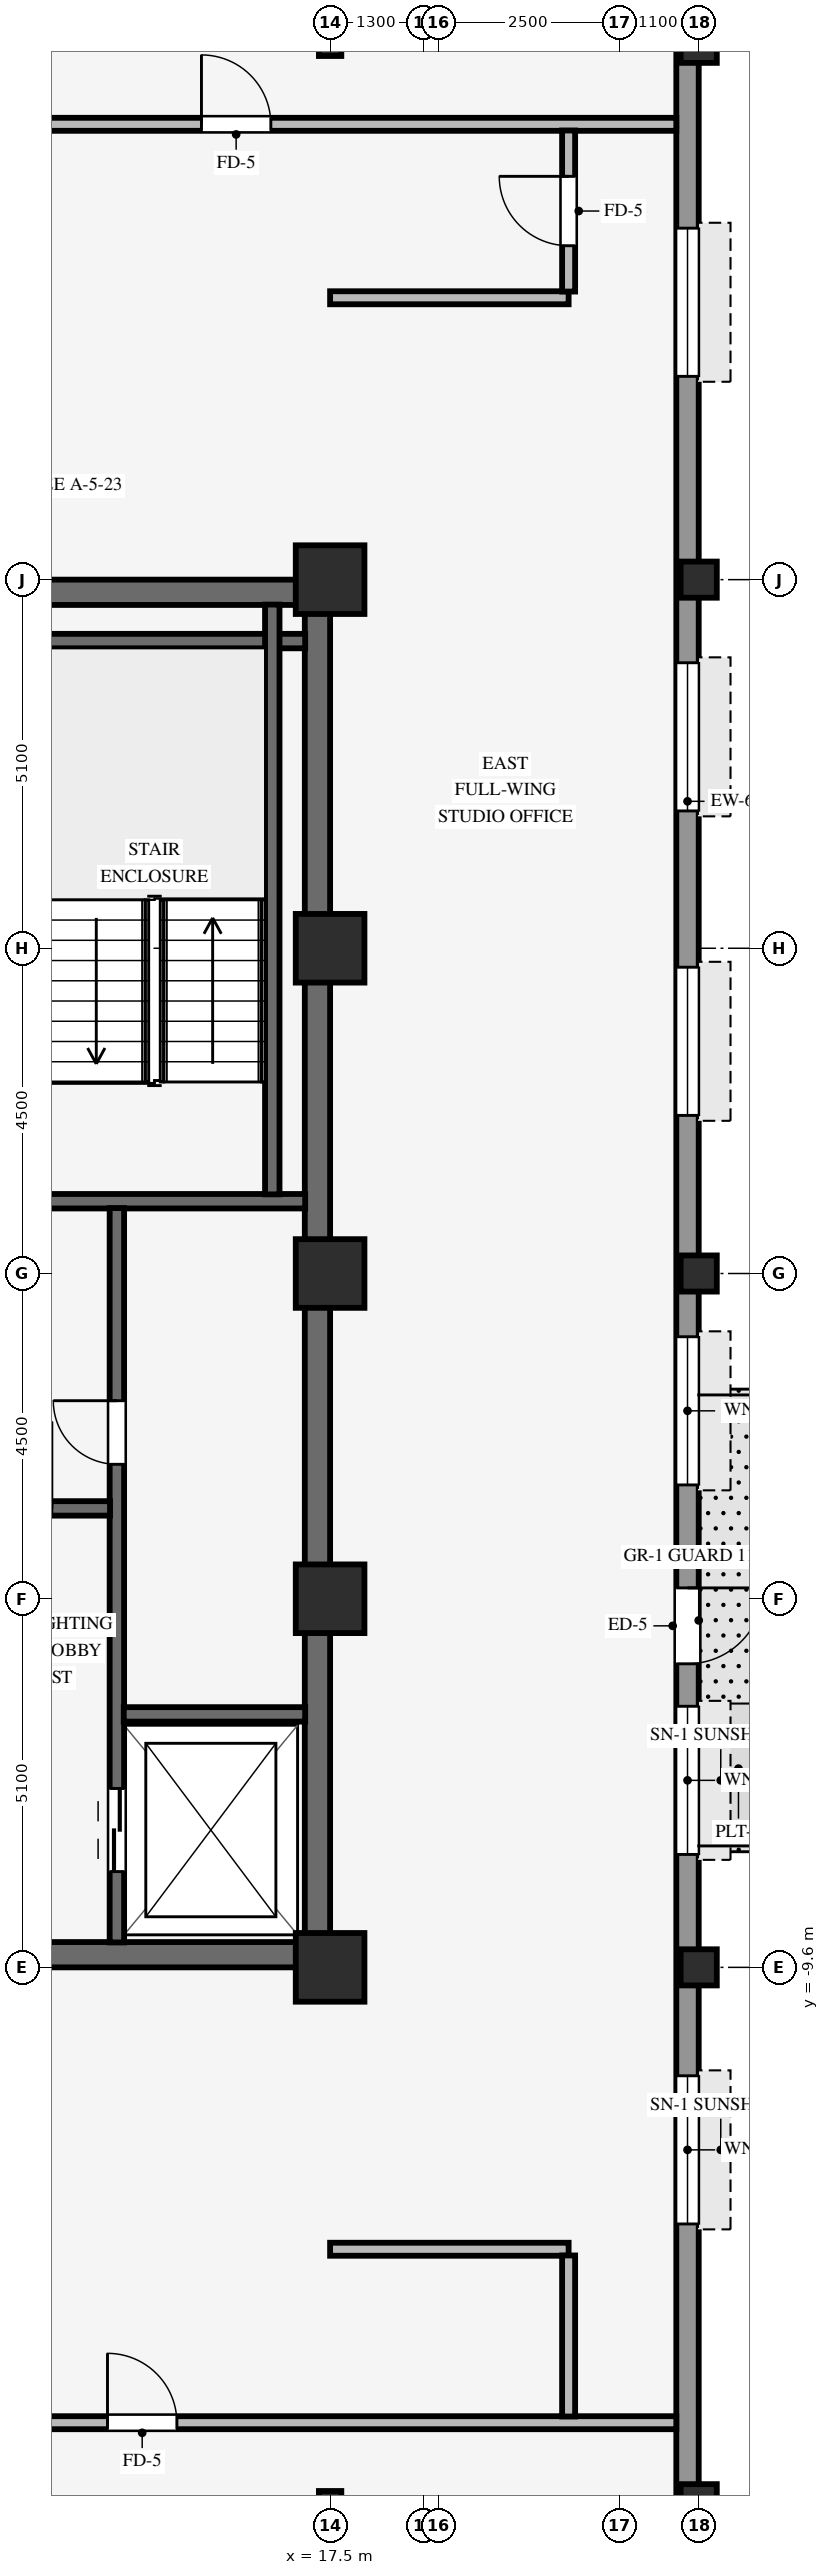
"""IFC4 building model, lengths in metres.
Left out: names, types, materials, properties, quantities, classifications, styles, units other than length and angle.
Written with IfcOpenShell. Run it as: python <this file> out.ifc"""

import sys

from ifc_helpers import new_model, si_unit, direction, frame, frame_2d, origin, origin_2d, place, context, subcontext, project, spatial, rectangle, hollow_rectangle, i_section, extrude, source, transform, mapped, element, fill, save


model = new_model("IFC4")
c1 = context("Model", 3, precision=1e-05, world=origin(), true_north=direction((0.0, 1.0)))
c2 = subcontext(c1, "Body", "Model", "MODEL_VIEW")
j1 = project(units=[si_unit("LENGTHUNIT", "METRE"), si_unit("PLANEANGLEUNIT", "RADIAN")], contexts=[c1])
p1 = place(None, origin())
s1 = spatial("IfcSite", under=j1, at=p1, CompositionType="ELEMENT")
p2 = place(p1, origin())
s2 = spatial("IfcBuilding", under=s1, at=p2, CompositionType="ELEMENT")
p3 = place(p2, frame((0.0, 0.0, 201.85)))
s3 = spatial("IfcBuildingStorey", under=s2, at=p3, CompositionType="ELEMENT", Elevation=201.85)
for number, where, z_axis, x_axis in (
    (1, (9.0, -9.425, 0.0), (0.0, 0.0, 1.0), (1.0, 0.0, 0.0)),
    (2, (9.0, 9.425, 0.0), (0.0, 0.0, 1.0), (1.0, 0.0, 0.0)),
):
    element("IfcWall", number, at=place(p3, frame(where, z_axis=z_axis, x_axis=x_axis)), inside=s3, PredefinedType="SHEAR", context=c2, shape_type="SweptSolid", body=[
        extrude(rectangle(XDim=8.5, YDim=0.35, at=frame_2d((4.25, 0.0))), origin(), (0.0, 0.0, 1.0), 3.37),
    ])
p4 = place(p3, frame((17.325, -9.255, 0.0), z_axis=(0.0, 0.0, 1.0), x_axis=(0.0, 1.0, 0.0)))
e3 = element("IfcWall", 3, at=p4, inside=s3, PredefinedType="SHEAR", context=c2, shape_type="SweptSolid", body=[
    extrude(rectangle(XDim=18.51, YDim=0.35, at=frame_2d((9.255, 0.0))), origin(), (0.0, 0.0, 1.0), 3.37),
])
for number, where, z_axis, x_axis in (
    (4, (17.5, -9.6, 0.0), (0.0, 0.0, 1.0), (1.0, 0.0, 0.0)),
    (5, (17.5, -4.5, 0.0), (0.0, 0.0, 1.0), (1.0, 0.0, 0.0)),
    (6, (17.5, 4.5, 0.0), (0.0, 0.0, 1.0), (1.0, 0.0, 0.0)),
    (7, (17.5, 9.6, 0.0), (0.0, 0.0, 1.0), (1.0, 0.0, 0.0)),
    (8, (17.5, 0.0, 0.0), (0.0, 0.0, 1.0), (1.0, 0.0, 0.0)),
):
    element("IfcColumn", number, at=place(p3, frame(where, z_axis=z_axis, x_axis=x_axis)), inside=s3, PredefinedType="COLUMN", context=c2, shape_type="SweptSolid", body=[
        extrude(rectangle(XDim=0.95, YDim=0.95, at=origin_2d()), origin(), (0.0, 0.0, 1.0), 3.37),
    ])
for number, where, z_axis, x_axis in (
    (9, (22.6, -17.0, 0.0), (0.0, 0.0, 1.0), (1.0, 0.0, 0.0)),
    (10, (22.6, -9.6, 0.0), (0.0, 0.0, 1.0), (1.0, 0.0, 0.0)),
    (11, (22.6, 0.0, 0.0), (0.0, 0.0, 1.0), (1.0, 0.0, 0.0)),
    (12, (22.6, 9.6, 0.0), (0.0, 0.0, 1.0), (1.0, 0.0, 0.0)),
    (13, (22.6, 17.0, 0.0), (0.0, 0.0, 1.0), (1.0, 0.0, 0.0)),
):
    element("IfcColumn", number, at=place(p3, frame(where, z_axis=z_axis, x_axis=x_axis)), inside=s3, PredefinedType="COLUMN", context=c2, shape_type="SweptSolid", body=[
        extrude(hollow_rectangle(XDim=0.5, YDim=0.5, WallThickness=0.032, InnerFilletRadius=0.032, OuterFilletRadius=0.064, at=origin_2d()), origin(), (0.0, 0.0, 1.0), 3.37),
    ])
for number, where, z_axis, x_axis in (
    (14, (17.5, -17.0, 0.0), (0.0, 0.0, 1.0), (1.0, 0.0, 0.0)),
    (15, (17.5, 17.0, 0.0), (0.0, 0.0, 1.0), (1.0, 0.0, 0.0)),
):
    element("IfcColumn", number, at=place(p3, frame(where, z_axis=z_axis, x_axis=x_axis)), inside=s3, PredefinedType="COLUMN", context=c2, shape_type="SweptSolid", body=[
        extrude(i_section(OverallWidth=0.31, OverallDepth=0.31, WebThickness=0.015, FlangeThickness=0.015, FilletRadius=0.015, at=origin_2d()), origin(), (0.0, 0.0, 1.0), 3.37),
    ])
p5 = place(p3, frame((22.445, -20.794, 0.0), z_axis=(0.0, 0.0, 1.0), x_axis=(0.0, 1.0, 0.0)))
e16 = element("IfcWall", 16, at=p5, inside=s3, PredefinedType="STANDARD", context=c2, shape_type="SweptSolid", body=[
    extrude(rectangle(XDim=37.788, YDim=0.31, at=frame_2d((18.894, 0.0))), origin(), (0.0, 0.0, 1.0), 2.705),
])
p6 = place(p5, frame((16.444, 0.0, 0.0), z_axis=(0.0, 0.0, 1.0), x_axis=(-1.0, 0.0, 0.0)))
e17 = element("IfcOpeningElement", 17, at=p6, cuts=e16, PredefinedType="OPENING", context=c2, shape_type="SweptSolid", body=[
    extrude(rectangle(XDim=1.05, YDim=2.1, at=frame_2d((0.525, 1.05))), frame((0.0, 0.165, 0.0), z_axis=(0.0, -1.0, 0.0), x_axis=(1.0, 0.0, 0.0)), (0.0, 0.0, 1.0), 0.33),
])
p7 = place(p5, frame((7.644, 0.0, 0.8)))
e18 = element("IfcOpeningElement", 18, at=p7, cuts=e16, PredefinedType="OPENING", context=c2, shape_type="SweptSolid", body=[
    extrude(rectangle(XDim=2.05, YDim=1.52, at=frame_2d((1.025, 0.76))), frame((0.0, 0.165, 0.0), z_axis=(0.0, -1.0, 0.0), x_axis=(1.0, 0.0, 0.0)), (0.0, 0.0, 1.0), 0.33),
])
p8 = place(p5, frame((12.756, 0.0, 0.8)))
e19 = element("IfcOpeningElement", 19, at=p8, cuts=e16, PredefinedType="OPENING", context=c2, shape_type="SweptSolid", body=[
    extrude(rectangle(XDim=2.05, YDim=1.52, at=frame_2d((1.025, 0.76))), frame((0.0, 0.165, 0.0), z_axis=(0.0, -1.0, 0.0), x_axis=(1.0, 0.0, 0.0)), (0.0, 0.0, 1.0), 0.33),
])
p9 = place(p5, frame((17.869, 0.0, 0.8)))
e20 = element("IfcOpeningElement", 20, at=p9, cuts=e16, PredefinedType="OPENING", context=c2, shape_type="SweptSolid", body=[
    extrude(rectangle(XDim=2.05, YDim=1.52, at=frame_2d((1.025, 0.76))), frame((0.0, 0.165, 0.0), z_axis=(0.0, -1.0, 0.0), x_axis=(1.0, 0.0, 0.0)), (0.0, 0.0, 1.0), 0.33),
])
p10 = place(p5, frame((22.982, 0.0, 0.8)))
e21 = element("IfcOpeningElement", 21, at=p10, cuts=e16, PredefinedType="OPENING", context=c2, shape_type="SweptSolid", body=[
    extrude(rectangle(XDim=2.05, YDim=1.52, at=frame_2d((1.025, 0.76))), frame((0.0, 0.165, 0.0), z_axis=(0.0, -1.0, 0.0), x_axis=(1.0, 0.0, 0.0)), (0.0, 0.0, 1.0), 0.33),
])
p11 = place(p5, frame((27.194, 0.0, 0.8)))
e22 = element("IfcOpeningElement", 22, at=p11, cuts=e16, PredefinedType="OPENING", context=c2, shape_type="SweptSolid", body=[
    extrude(rectangle(XDim=2.05, YDim=1.52, at=frame_2d((1.025, 0.76))), frame((0.0, 0.165, 0.0), z_axis=(0.0, -1.0, 0.0), x_axis=(1.0, 0.0, 0.0)), (0.0, 0.0, 1.0), 0.33),
])
p12 = place(p5, frame((33.207, 0.0, 0.8)))
e23 = element("IfcOpeningElement", 23, at=p12, cuts=e16, PredefinedType="OPENING", context=c2, shape_type="SweptSolid", body=[
    extrude(rectangle(XDim=2.05, YDim=1.52, at=frame_2d((1.025, 0.76))), frame((0.0, 0.165, 0.0), z_axis=(0.0, -1.0, 0.0), x_axis=(1.0, 0.0, 0.0)), (0.0, 0.0, 1.0), 0.33),
])
for number, where, z_axis, x_axis in (
    (24, (13.535, 1.0, 0.0), (0.0, 0.0, 1.0), (1.0, 0.0, 0.0)),
    (25, (13.535, 8.75, 0.0), (0.0, 0.0, 1.0), (1.0, 0.0, 0.0)),
):
    element("IfcWall", number, at=place(p3, frame(where, z_axis=z_axis, x_axis=x_axis)), inside=s3, PredefinedType="SHEAR", context=c2, shape_type="SweptSolid", body=[
        extrude(rectangle(XDim=3.62, YDim=0.2, at=frame_2d((1.81, 0.0))), origin(), (0.0, 0.0, 1.0), 3.37),
    ])
p13 = place(p3, frame((16.7, 1.095, 0.0), z_axis=(0.0, 0.0, 1.0), x_axis=(0.0, 1.0, 0.0)))
e26 = element("IfcWall", 26, at=p13, inside=s3, PredefinedType="SHEAR", context=c2, shape_type="SweptSolid", body=[
    extrude(rectangle(XDim=8.16, YDim=0.2, at=frame_2d((4.08, 0.0))), origin(), (0.0, 0.0, 1.0), 3.37),
])
p14 = place(p3, frame((14.55, -9.255, 0.0), z_axis=(0.0, 0.0, 1.0), x_axis=(0.0, 1.0, 0.0)))
e27 = element("IfcWall", 27, at=p14, inside=s3, PredefinedType="SHEAR", context=c2, shape_type="SweptSolid", body=[
    extrude(rectangle(XDim=10.16, YDim=0.2, at=frame_2d((5.08, 0.0))), origin(), (0.0, 0.0, 1.0), 3.37),
])
p15 = place(p14, frame((6.615, 0.0, 0.0)))
e28 = element("IfcOpeningElement", 28, at=p15, cuts=e27, PredefinedType="OPENING", context=c2, shape_type="SweptSolid", body=[
    extrude(rectangle(XDim=0.88, YDim=2.1, at=frame_2d((0.44, 1.05))), frame((0.0, 0.11, 0.0), z_axis=(0.0, -1.0, 0.0), x_axis=(1.0, 0.0, 0.0)), (0.0, 0.0, 1.0), 0.22),
])
p16 = place(p14, frame((0.98, 0.0, 0.0)))
e29 = element("IfcOpeningElement", 29, at=p16, cuts=e27, PredefinedType="OPENING", context=c2, shape_type="SweptSolid", body=[
    extrude(rectangle(XDim=1.15, YDim=2.15, at=frame_2d((0.575, 1.075))), frame((0.0, 0.11, 0.0), z_axis=(0.0, -1.0, 0.0), x_axis=(1.0, 0.0, 0.0)), (0.0, 0.0, 1.0), 0.22),
])
p17 = place(p3, frame((14.645, -6.1, 0.0), z_axis=(0.0, 0.0, 1.0), x_axis=(1.0, 0.0, 0.0)))
e30 = element("IfcWall", 30, at=p17, inside=s3, PredefinedType="SHEAR", context=c2, shape_type="SweptSolid", body=[
    extrude(rectangle(XDim=2.51, YDim=0.2, at=frame_2d((1.255, 0.0))), origin(), (0.0, 0.0, 1.0), 3.37),
])
p18 = place(p3, frame((11.695, -3.25, 0.0), z_axis=(0.0, 0.0, 1.0), x_axis=(1.0, 0.0, 0.0)))
e31 = element("IfcWall", 31, at=p18, inside=s3, PredefinedType="SHEAR", context=c2, shape_type="SweptSolid", body=[
    extrude(rectangle(XDim=2.76, YDim=0.2, at=frame_2d((1.38, 0.0))), origin(), (0.0, 0.0, 1.0), 3.37),
])
p19 = place(p18, frame((0.755, 0.0, 0.0)))
e32 = element("IfcOpeningElement", 32, at=p19, cuts=e31, PredefinedType="OPENING", context=c2, shape_type="SweptSolid", body=[
    extrude(rectangle(XDim=1.2, YDim=2.15, at=frame_2d((0.6, 1.075))), frame((0.0, 0.11, 0.0), z_axis=(0.0, -1.0, 0.0), x_axis=(1.0, 0.0, 0.0)), (0.0, 0.0, 1.0), 0.22),
])
p20 = place(p3, frame((-26.09, -15.9, 0.0), z_axis=(0.0, 0.0, 1.0), x_axis=(1.0, 0.0, 0.0)))
e33 = element("IfcWall", 33, at=p20, inside=s3, PredefinedType="PARTITIONING", context=c2, shape_type="SweptSolid", body=[
    extrude(rectangle(XDim=48.38, YDim=0.18, at=frame_2d((24.19, 0.0))), origin(), (0.0, 0.0, 1.0), 3.36),
])
p21 = place(p20, frame((15.56, 0.0, 0.0)))
e34 = element("IfcOpeningElement", 34, at=p21, cuts=e33, PredefinedType="OPENING", context=c2, shape_type="SweptSolid", body=[
    extrude(rectangle(XDim=0.96, YDim=2.1, at=frame_2d((0.48, 1.05))), frame((0.0, 0.1, 0.0), z_axis=(0.0, -1.0, 0.0), x_axis=(1.0, 0.0, 0.0)), (0.0, 0.0, 1.0), 0.2),
])
p22 = place(p20, frame((40.51, 0.0, 0.0)))
e35 = element("IfcOpeningElement", 35, at=p22, cuts=e33, PredefinedType="OPENING", context=c2, shape_type="SweptSolid", body=[
    extrude(rectangle(XDim=0.96, YDim=2.1, at=frame_2d((0.48, 1.05))), frame((0.0, 0.1, 0.0), z_axis=(0.0, -1.0, 0.0), x_axis=(1.0, 0.0, 0.0)), (0.0, 0.0, 1.0), 0.2),
])
p23 = place(p20, frame((6.66, 0.0, 0.0)))
e36 = element("IfcOpeningElement", 36, at=p23, cuts=e33, PredefinedType="OPENING", context=c2, shape_type="SweptSolid", body=[
    extrude(rectangle(XDim=0.96, YDim=2.1, at=frame_2d((0.48, 1.05))), frame((0.0, 0.1, 0.0), z_axis=(0.0, -1.0, 0.0), x_axis=(1.0, 0.0, 0.0)), (0.0, 0.0, 1.0), 0.2),
])
for number, where, z_axis, x_axis in (
    (37, (17.5, -13.5, 0.0), (0.0, 0.0, 1.0), (1.0, 0.0, 0.0)),
    (38, (17.5, 13.5, 0.0), (0.0, 0.0, 1.0), (1.0, 0.0, 0.0)),
):
    element("IfcWall", number, at=place(p3, frame(where, z_axis=z_axis, x_axis=x_axis)), inside=s3, PredefinedType="PARTITIONING", context=c2, shape_type="SweptSolid", body=[
        extrude(rectangle(XDim=3.3, YDim=0.18, at=frame_2d((1.65, 0.0))), origin(), (0.0, 0.0, 1.0), 3.008),
    ])
p24 = place(p3, frame((-26.09, 15.9, 0.0), z_axis=(0.0, 0.0, 1.0), x_axis=(1.0, 0.0, 0.0)))
e39 = element("IfcWall", 39, at=p24, inside=s3, PredefinedType="PARTITIONING", context=c2, shape_type="SweptSolid", body=[
    extrude(rectangle(XDim=48.38, YDim=0.18, at=frame_2d((24.19, 0.0))), origin(), (0.0, 0.0, 1.0), 3.36),
])
p25 = place(p24, frame((41.81, 0.0, 0.0)))
e40 = element("IfcOpeningElement", 40, at=p25, cuts=e39, PredefinedType="OPENING", context=c2, shape_type="SweptSolid", body=[
    extrude(rectangle(XDim=0.96, YDim=2.1, at=frame_2d((0.48, 1.05))), frame((0.0, 0.1, 0.0), z_axis=(0.0, -1.0, 0.0), x_axis=(1.0, 0.0, 0.0)), (0.0, 0.0, 1.0), 0.2),
])
p26 = place(p24, frame((17.985, 0.0, 0.0)))
e41 = element("IfcOpeningElement", 41, at=p26, cuts=e39, PredefinedType="OPENING", context=c2, shape_type="SweptSolid", body=[
    extrude(rectangle(XDim=0.96, YDim=2.1, at=frame_2d((0.48, 1.05))), frame((0.0, 0.1, 0.0), z_axis=(0.0, -1.0, 0.0), x_axis=(1.0, 0.0, 0.0)), (0.0, 0.0, 1.0), 0.2),
])
p27 = place(p24, frame((26.55, 0.0, 0.0)))
e42 = element("IfcOpeningElement", 42, at=p27, cuts=e39, PredefinedType="OPENING", context=c2, shape_type="SweptSolid", body=[
    extrude(rectangle(XDim=0.96, YDim=2.1, at=frame_2d((0.48, 1.05))), frame((0.0, 0.1, 0.0), z_axis=(0.0, -1.0, 0.0), x_axis=(1.0, 0.0, 0.0)), (0.0, 0.0, 1.0), 0.2),
])
p28 = place(p24, frame((10.935, 0.0, 0.0)))
e43 = element("IfcOpeningElement", 43, at=p28, cuts=e39, PredefinedType="OPENING", context=c2, shape_type="SweptSolid", body=[
    extrude(rectangle(XDim=0.96, YDim=2.1, at=frame_2d((0.48, 1.05))), frame((0.0, 0.1, 0.0), z_axis=(0.0, -1.0, 0.0), x_axis=(1.0, 0.0, 0.0)), (0.0, 0.0, 1.0), 0.2),
])
p29 = place(p24, frame((35.91, 0.0, 0.0)))
e44 = element("IfcOpeningElement", 44, at=p29, cuts=e39, PredefinedType="OPENING", context=c2, shape_type="SweptSolid", body=[
    extrude(rectangle(XDim=0.96, YDim=2.1, at=frame_2d((0.48, 1.05))), frame((0.0, 0.1, 0.0), z_axis=(0.0, -1.0, 0.0), x_axis=(1.0, 0.0, 0.0)), (0.0, 0.0, 1.0), 0.2),
])
p30 = place(p3, frame((20.8, -15.814, 0.0), z_axis=(0.0, 0.0, 1.0), x_axis=(0.0, 1.0, 0.0)))
e45 = element("IfcWall", 45, at=p30, inside=s3, PredefinedType="PARTITIONING", context=c2, shape_type="SweptSolid", body=[
    extrude(rectangle(XDim=2.228, YDim=0.18, at=frame_2d((1.114, 0.0))), origin(), (0.0, 0.0, 1.0), 3.36),
])
p31 = place(p3, frame((20.8, 13.586, 0.0), z_axis=(0.0, 0.0, 1.0), x_axis=(0.0, 1.0, 0.0)))
e46 = element("IfcWall", 46, at=p31, inside=s3, PredefinedType="PARTITIONING", context=c2, shape_type="SweptSolid", body=[
    extrude(rectangle(XDim=2.228, YDim=0.18, at=frame_2d((1.114, 0.0))), origin(), (0.0, 0.0, 1.0), 3.36),
])
p32 = place(p31, frame((0.634, 0.0, 0.0)))
e47 = element("IfcOpeningElement", 47, at=p32, cuts=e46, PredefinedType="OPENING", context=c2, shape_type="SweptSolid", body=[
    extrude(rectangle(XDim=0.96, YDim=2.1, at=frame_2d((0.48, 1.05))), frame((0.0, 0.1, 0.0), z_axis=(0.0, -1.0, 0.0), x_axis=(1.0, 0.0, 0.0)), (0.0, 0.0, 1.0), 0.2),
])
m1 = source(origin(), c2, "Body", "SweptSolid", [
    extrude(rectangle(XDim=1.05, YDim=2.1, at=frame_2d((0.525, 1.05))), frame((0.0, 0.025, 0.0), z_axis=(0.0, -1.0, 0.0), x_axis=(1.0, 0.0, 0.0)), (0.0, 0.0, 1.0), 0.05),
])
p33 = place(p6, origin())
e48 = element("IfcDoor", 48, at=p33, inside=s3, OperationType="SINGLE_SWING_LEFT", PredefinedType="DOOR", context=c2, shape_type="MappedRepresentation", body=[
    mapped(m1, transform((0.0, 0.0, 0.0), scale=1.0)),
])
fill(e17, e48)
m2 = source(origin(), c2, "Body", "SweptSolid", [
    extrude(rectangle(XDim=2.05, YDim=1.52, at=frame_2d((1.025, 0.76))), frame((0.0, 0.03, 0.0), z_axis=(0.0, -1.0, 0.0), x_axis=(1.0, 0.0, 0.0)), (0.0, 0.0, 1.0), 0.06),
])
p34 = place(p7, origin())
e49 = element("IfcWindow", 49, at=p34, inside=s3, PartitioningType="SINGLE_PANEL", PredefinedType="WINDOW", context=c2, shape_type="MappedRepresentation", body=[
    mapped(m2, transform((0.0, 0.0, 0.0), scale=1.0)),
])
fill(e18, e49)
p35 = place(p8, origin())
e50 = element("IfcWindow", 50, at=p35, inside=s3, PartitioningType="SINGLE_PANEL", PredefinedType="WINDOW", context=c2, shape_type="MappedRepresentation", body=[
    mapped(m2, transform((0.0, 0.0, 0.0), scale=1.0)),
])
fill(e19, e50)
p36 = place(p9, origin())
e51 = element("IfcWindow", 51, at=p36, inside=s3, PartitioningType="SINGLE_PANEL", PredefinedType="WINDOW", context=c2, shape_type="MappedRepresentation", body=[
    mapped(m2, transform((0.0, 0.0, 0.0), scale=1.0)),
])
fill(e20, e51)
p37 = place(p10, origin())
e52 = element("IfcWindow", 52, at=p37, inside=s3, PartitioningType="SINGLE_PANEL", PredefinedType="WINDOW", context=c2, shape_type="MappedRepresentation", body=[
    mapped(m2, transform((0.0, 0.0, 0.0), scale=1.0)),
])
fill(e21, e52)
p38 = place(p11, origin())
e53 = element("IfcWindow", 53, at=p38, inside=s3, PartitioningType="SINGLE_PANEL", PredefinedType="WINDOW", context=c2, shape_type="MappedRepresentation", body=[
    mapped(m2, transform((0.0, 0.0, 0.0), scale=1.0)),
])
fill(e22, e53)
p39 = place(p12, origin())
e54 = element("IfcWindow", 54, at=p39, inside=s3, PartitioningType="SINGLE_PANEL", PredefinedType="WINDOW", context=c2, shape_type="MappedRepresentation", body=[
    mapped(m2, transform((0.0, 0.0, 0.0), scale=1.0)),
])
fill(e23, e54)
m3 = source(origin(), c2, "Body", "SweptSolid", [
    extrude(rectangle(XDim=0.88, YDim=2.1, at=frame_2d((0.44, 1.05))), frame((0.0, 0.025, 0.0), z_axis=(0.0, -1.0, 0.0), x_axis=(1.0, 0.0, 0.0)), (0.0, 0.0, 1.0), 0.05),
])
p40 = place(p15, origin())
e55 = element("IfcDoor", 55, at=p40, inside=s3, OperationType="SINGLE_SWING_RIGHT", PredefinedType="DOOR", context=c2, shape_type="MappedRepresentation", body=[
    mapped(m3, transform((0.0, 0.0, 0.0), scale=1.0)),
])
fill(e28, e55)
m4 = source(origin(), c2, "Body", "SweptSolid", [
    extrude(rectangle(XDim=1.2, YDim=2.15, at=frame_2d((0.6, 1.075))), frame((0.0, 0.025, 0.0), z_axis=(0.0, -1.0, 0.0), x_axis=(1.0, 0.0, 0.0)), (0.0, 0.0, 1.0), 0.05),
])
p41 = place(p19, origin())
e56 = element("IfcDoor", 56, at=p41, inside=s3, OperationType="SINGLE_SWING_RIGHT", PredefinedType="DOOR", context=c2, shape_type="MappedRepresentation", body=[
    mapped(m4, transform((0.0, 0.0, 0.0), scale=1.0)),
])
fill(e32, e56)
m5 = source(origin(), c2, "Body", "SweptSolid", [
    extrude(rectangle(XDim=1.15, YDim=2.15, at=frame_2d((0.575, 1.075))), frame((0.0, 0.025, 0.0), z_axis=(0.0, -1.0, 0.0), x_axis=(1.0, 0.0, 0.0)), (0.0, 0.0, 1.0), 0.05),
])
p42 = place(p16, origin())
e57 = element("IfcDoor", 57, at=p42, inside=s3, OperationType="DOUBLE_DOOR_SLIDING", PredefinedType="DOOR", context=c2, shape_type="MappedRepresentation", body=[
    mapped(m5, transform((0.0, 0.0, 0.0), scale=1.0)),
])
fill(e29, e57)
m6 = source(origin(), c2, "Body", "SweptSolid", [
    extrude(rectangle(XDim=0.96, YDim=2.1, at=frame_2d((0.48, 1.05))), frame((0.0, 0.025, 0.0), z_axis=(0.0, -1.0, 0.0), x_axis=(1.0, 0.0, 0.0)), (0.0, 0.0, 1.0), 0.05),
])
p43 = place(p22, origin())
e58 = element("IfcDoor", 58, at=p43, inside=s3, OperationType="SINGLE_SWING_LEFT", PredefinedType="DOOR", context=c2, shape_type="MappedRepresentation", body=[
    mapped(m6, transform((0.0, 0.0, 0.0), scale=1.0)),
])
fill(e35, e58)
p44 = place(p25, origin())
e59 = element("IfcDoor", 59, at=p44, inside=s3, OperationType="SINGLE_SWING_LEFT", PredefinedType="DOOR", context=c2, shape_type="MappedRepresentation", body=[
    mapped(m6, transform((0.0, 0.0, 0.0), scale=1.0)),
])
fill(e40, e59)
p45 = place(p32, origin())
e60 = element("IfcDoor", 60, at=p45, inside=s3, OperationType="SINGLE_SWING_RIGHT", PredefinedType="DOOR", context=c2, shape_type="MappedRepresentation", body=[
    mapped(m6, transform((0.0, 0.0, 0.0), scale=1.0)),
])
fill(e47, e60)
save(model, sys.argv[1])
